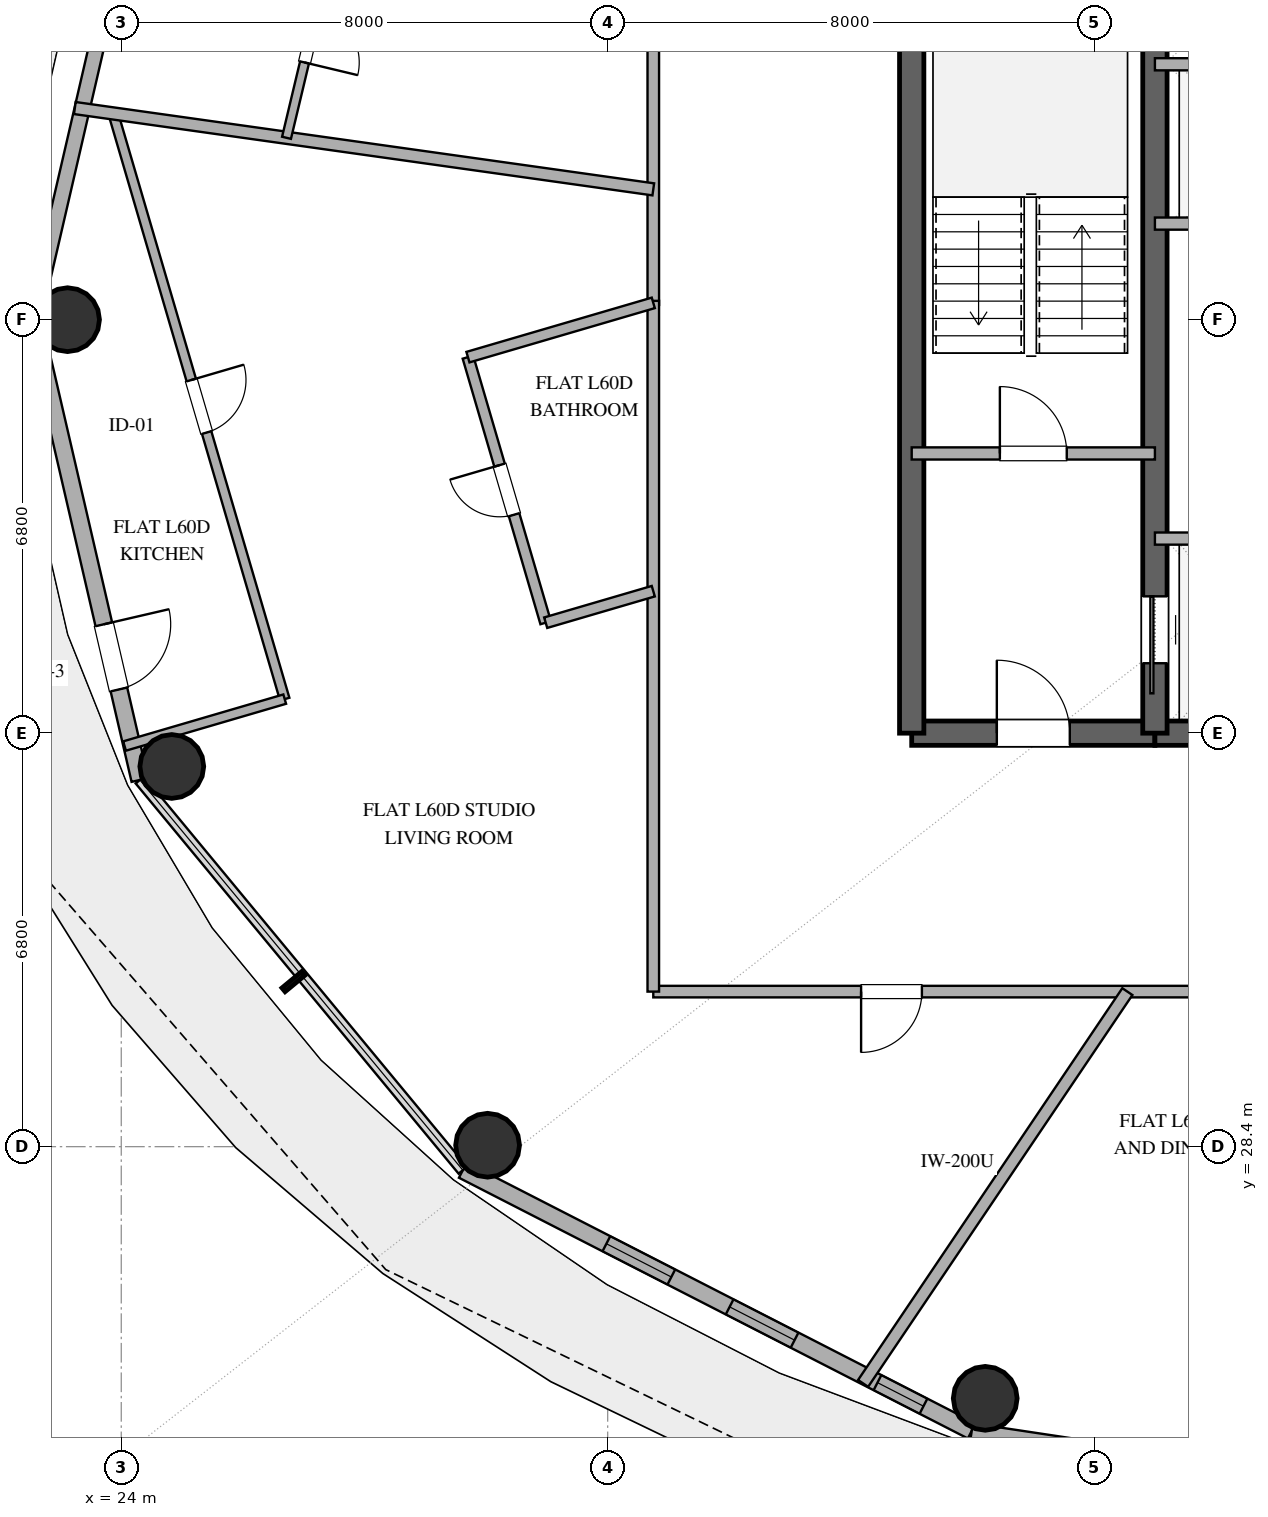
"""IFC4 building model, lengths in metres.
Left out: names, types, materials, properties, quantities, classifications, styles, units other than length and angle.
Written with IfcOpenShell. Run it as: python <this file> out.ifc"""

import sys

from ifc_helpers import new_model, si_unit, direction, frame, frame_2d, origin, origin_2d, place, context, subcontext, project, spatial, rectangle, hollow_circle, extrude, element, fill, save


model = new_model("IFC4")
c1 = context("Model", 3, precision=1e-05, world=origin(), true_north=direction((0.0, 1.0)))
c2 = subcontext(c1, "Body", "Model", "MODEL_VIEW")
j1 = project(units=[si_unit("LENGTHUNIT", "METRE"), si_unit("PLANEANGLEUNIT", "RADIAN")], contexts=[c1])
p1 = place(None, origin())
s1 = spatial("IfcSite", under=j1, at=p1, CompositionType="ELEMENT")
p2 = place(p1, origin())
s2 = spatial("IfcBuilding", under=s1, at=p2, CompositionType="ELEMENT")
p3 = place(p2, frame((0.0, 0.0, 235.2)))
s3 = spatial("IfcBuildingStorey", under=s2, at=p3, CompositionType="ELEMENT", Elevation=235.2)
p4 = place(p3, frame((37.0, 35.2, 0.0), z_axis=(0.0, 0.0, 1.0), x_axis=(1.0, 0.0, 0.0)))
e1 = element("IfcWall", 1, at=p4, inside=s3, PredefinedType="SHEAR", context=c2, shape_type="SweptSolid", body=[
    extrude(rectangle(XDim=4.0, YDim=0.4, at=frame_2d((2.0, 0.0))), origin(), (0.0, 0.0, 1.0), 3.36),
])
p5 = place(p4, frame((1.4, 0.0, 0.0)))
e2 = element("IfcOpeningElement", 2, at=p5, cuts=e1, PredefinedType="OPENING", context=c2, shape_type="SweptSolid", body=[
    extrude(rectangle(XDim=1.2, YDim=2.15, at=frame_2d((0.6, 1.075))), frame((0.0, 0.21, 0.0), z_axis=(0.0, -1.0, 0.0), x_axis=(1.0, 0.0, 0.0)), (0.0, 0.0, 1.0), 0.42),
])
p6 = place(p3, frame((41.0, 35.2, 0.0), z_axis=(0.0, 0.0, 1.0), x_axis=(1.0, 0.0, 0.0)))
e3 = element("IfcWall", 3, at=p6, inside=s3, PredefinedType="SHEAR", context=c2, shape_type="SweptSolid", body=[
    extrude(rectangle(XDim=14.0, YDim=0.4, at=frame_2d((7.0, 0.0))), origin(), (0.0, 0.0, 1.0), 3.36),
])
p7 = place(p6, frame((6.1, 0.0, 0.0)))
e4 = element("IfcOpeningElement", 4, at=p7, cuts=e3, PredefinedType="OPENING", context=c2, shape_type="SweptSolid", body=[
    extrude(rectangle(XDim=1.8, YDim=2.25, at=frame_2d((0.9, 1.125))), frame((0.0, 0.21, 0.0), z_axis=(0.0, -1.0, 0.0), x_axis=(1.0, 0.0, 0.0)), (0.0, 0.0, 1.0), 0.42),
])
p8 = place(p3, frame((37.0, 35.2, 0.0), z_axis=(0.0, 0.0, 1.0), x_axis=(0.0, 1.0, 0.0)))
e5 = element("IfcWall", 5, at=p8, inside=s3, PredefinedType="SHEAR", context=c2, shape_type="SweptSolid", body=[
    extrude(rectangle(XDim=13.6, YDim=0.4, at=frame_2d((6.8, 0.0))), origin(), (0.0, 0.0, 1.0), 3.36),
])
p9 = place(p3, frame((41.0, 35.2, 0.0), z_axis=(0.0, 0.0, 1.0), x_axis=(0.0, 1.0, 0.0)))
e6 = element("IfcWall", 6, at=p9, inside=s3, PredefinedType="SHEAR", context=c2, shape_type="SweptSolid", body=[
    extrude(rectangle(XDim=13.6, YDim=0.4, at=frame_2d((6.8, 0.0))), origin(), (0.0, 0.0, 1.0), 3.36),
])
p10 = place(p9, frame((1.15, 0.0, 0.0)))
e7 = element("IfcOpeningElement", 7, at=p10, cuts=e6, PredefinedType="OPENING", context=c2, shape_type="SweptSolid", body=[
    extrude(rectangle(XDim=1.1, YDim=2.2, at=frame_2d((0.55, 1.1))), frame((0.0, 0.21, 0.0), z_axis=(0.0, -1.0, 0.0), x_axis=(1.0, 0.0, 0.0)), (0.0, 0.0, 1.0), 0.42),
])
for number, where, z_axis, x_axis in (
    (8, (23.117, 42.0, 0.0), (0.0, 0.0, 1.0), (1.0, 0.0, 0.0)),
    (9, (24.831, 34.653, 0.0), (0.0, 0.0, 1.0), (1.0, 0.0, 0.0)),
    (10, (30.025, 28.424, 0.0), (0.0, 0.0, 1.0), (1.0, 0.0, 0.0)),
    (11, (38.209, 24.261, 0.0), (0.0, 0.0, 1.0), (1.0, 0.0, 0.0)),
):
    element("IfcColumn", number, at=place(p3, frame(where, z_axis=z_axis, x_axis=x_axis)), inside=s3, PredefinedType="COLUMN", context=c2, shape_type="SweptSolid", body=[
        extrude(hollow_circle(Radius=0.525, WallThickness=0.028, at=origin_2d()), origin(), (0.0, 0.0, 1.0), 3.36),
    ])
p11 = place(p3, frame((24.306, 49.57, 0.0), z_axis=(0.0, 0.0, 1.0), x_axis=(-0.225635078214, -0.974211892495, 0.0)))
e12 = element("IfcWall", 12, at=p11, inside=s3, PredefinedType="SOLIDWALL", context=c2, shape_type="SweptSolid", body=[
    extrude(rectangle(XDim=7.77, YDim=0.25, at=frame_2d((3.885, 0.0))), origin(), (0.0, 0.0, 1.0), 3.36),
])
p12 = place(p3, frame((22.553, 42.0, 0.0), z_axis=(0.0, 0.0, 1.0), x_axis=(0.225635078214, -0.974211892495, 0.0)))
e13 = element("IfcWall", 13, at=p12, inside=s3, PredefinedType="SOLIDWALL", context=c2, shape_type="SweptSolid", body=[
    extrude(rectangle(XDim=7.77, YDim=0.28, at=frame_2d((3.885, 0.0))), origin(), (0.0, 0.0, 1.0), 3.36),
])
p13 = place(p12, frame((5.142, 0.0, 0.0)))
e14 = element("IfcOpeningElement", 14, at=p13, cuts=e13, PredefinedType="OPENING", context=c2, shape_type="SweptSolid", body=[
    extrude(rectangle(XDim=1.1, YDim=2.25, at=frame_2d((0.55, 1.125))), frame((0.0, 0.15, 0.0), z_axis=(0.0, -1.0, 0.0), x_axis=(1.0, 0.0, 0.0)), (0.0, 0.0, 1.0), 0.3),
])
p14 = place(p3, frame((29.617, 28.013, 0.0), z_axis=(0.0, 0.0, 1.0), x_axis=(0.890007394051, -0.455946091699, 0.0)))
e15 = element("IfcWall", 15, at=p14, inside=s3, PredefinedType="SOLIDWALL", context=c2, shape_type="SweptSolid", body=[
    extrude(rectangle(XDim=9.404, YDim=0.28, at=frame_2d((4.702, 0.0))), origin(), (0.0, 0.0, 1.0), 3.36),
])
p15 = place(p14, frame((2.653, 0.0, 0.85)))
e16 = element("IfcOpeningElement", 16, at=p15, cuts=e15, PredefinedType="OPENING", context=c2, shape_type="SweptSolid", body=[
    extrude(rectangle(XDim=1.2, YDim=1.6, at=frame_2d((0.6, 0.8))), frame((0.0, 0.15, 0.0), z_axis=(0.0, -1.0, 0.0), x_axis=(1.0, 0.0, 0.0)), (0.0, 0.0, 1.0), 0.3),
])
p16 = place(p14, frame((4.93, 0.0, 0.85)))
e17 = element("IfcOpeningElement", 17, at=p16, cuts=e15, PredefinedType="OPENING", context=c2, shape_type="SweptSolid", body=[
    extrude(rectangle(XDim=1.2, YDim=1.6, at=frame_2d((0.6, 0.8))), frame((0.0, 0.15, 0.0), z_axis=(0.0, -1.0, 0.0), x_axis=(1.0, 0.0, 0.0)), (0.0, 0.0, 1.0), 0.3),
])
p17 = place(p14, frame((7.663, 0.0, 0.85)))
e18 = element("IfcOpeningElement", 18, at=p17, cuts=e15, PredefinedType="OPENING", context=c2, shape_type="SweptSolid", body=[
    extrude(rectangle(XDim=0.85, YDim=1.8, at=frame_2d((0.425, 0.9))), frame((0.0, 0.15, 0.0), z_axis=(0.0, -1.0, 0.0), x_axis=(1.0, 0.0, 0.0)), (0.0, 0.0, 1.0), 0.3),
])
p18 = place(p3, frame((37.987, 23.726, 0.0), z_axis=(0.0, 0.0, 1.0), x_axis=(0.988882522213, -0.148698881169, 0.0)))
e19 = element("IfcWall", 19, at=p18, inside=s3, PredefinedType="SOLIDWALL", context=c2, shape_type="SweptSolid", body=[
    extrude(rectangle(XDim=10.125, YDim=0.25, at=frame_2d((5.062, 0.0))), origin(), (0.0, 0.0, 1.0), 3.36),
])
p19 = place(p18, frame((8.259, 0.0, 0.35)))
e20 = element("IfcOpeningElement", 20, at=p19, cuts=e19, PredefinedType="OPENING", context=c2, shape_type="SweptSolid", body=[
    extrude(rectangle(XDim=1.0, YDim=1.05, at=frame_2d((0.5, 0.525))), frame((0.0, 0.135, 0.0), z_axis=(0.0, -1.0, 0.0), x_axis=(1.0, 0.0, 0.0)), (0.0, 0.0, 1.0), 0.27),
])
p20 = place(p3, frame((37.0, 39.8, 0.0), z_axis=(0.0, 0.0, 1.0), x_axis=(1.0, 0.0, 0.0)))
e21 = element("IfcWall", 21, at=p20, inside=s3, PredefinedType="SOLIDWALL", context=c2, shape_type="SweptSolid", body=[
    extrude(rectangle(XDim=4.0, YDim=0.2, at=frame_2d((2.0, 0.0))), origin(), (0.0, 0.0, 1.0), 2.72),
])
p21 = place(p20, frame((1.45, 0.0, 0.0)))
e22 = element("IfcOpeningElement", 22, at=p21, cuts=e21, PredefinedType="OPENING", context=c2, shape_type="SweptSolid", body=[
    extrude(rectangle(XDim=1.1, YDim=2.15, at=frame_2d((0.55, 1.075))), frame((0.0, 0.11, 0.0), z_axis=(0.0, -1.0, 0.0), x_axis=(1.0, 0.0, 0.0)), (0.0, 0.0, 1.0), 0.22),
])
for number, where, z_axis, x_axis in (
    (23, (41.0, 38.4, 0.0), (0.0, 0.0, 1.0), (1.0, 0.0, 0.0)),
    (24, (41.0, 46.2, 0.0), (0.0, 0.0, 1.0), (1.0, 0.0, 0.0)),
    (25, (41.0, 43.58, 0.0), (0.0, 0.0, 1.0), (1.0, 0.0, 0.0)),
):
    element("IfcWall", number, at=place(p3, frame(where, z_axis=z_axis, x_axis=x_axis)), inside=s3, PredefinedType="SOLIDWALL", context=c2, shape_type="SweptSolid", body=[
        extrude(rectangle(XDim=2.95, YDim=0.2, at=frame_2d((1.475, 0.0))), origin(), (0.0, 0.0, 1.0), 2.72),
    ])
p22 = place(p3, frame((23.868, 45.392, 0.0), z_axis=(0.0, 0.0, 1.0), x_axis=(0.281018983641, -0.959702209455, 0.0)))
e26 = element("IfcWall", 26, at=p22, inside=s3, PredefinedType="PLUMBINGWALL", context=c2, shape_type="SweptSolid", body=[
    extrude(rectangle(XDim=10.036, YDim=0.16, at=frame_2d((5.018, 0.0))), origin(), (0.0, 0.0, 1.0), 2.72),
])
p23 = place(p22, frame((4.568, 0.0, 0.0)))
e27 = element("IfcOpeningElement", 27, at=p23, cuts=e26, PredefinedType="OPENING", context=c2, shape_type="SweptSolid", body=[
    extrude(rectangle(XDim=0.9, YDim=2.1, at=frame_2d((0.45, 1.05))), frame((0.0, 0.09, 0.0), z_axis=(0.0, -1.0, 0.0), x_axis=(1.0, 0.0, 0.0)), (0.0, 0.0, 1.0), 0.18),
])
p24 = place(p3, frame((32.75, 42.243, 0.0), z_axis=(0.0, 0.0, 1.0), x_axis=(0.0, 1.0, 0.0)))
e28 = element("IfcWall", 28, at=p24, inside=s3, PredefinedType="PARTITIONING", context=c2, shape_type="SweptSolid", body=[
    extrude(rectangle(XDim=10.807, YDim=0.19, at=frame_2d((5.404, 0.0))), origin(), (0.0, 0.0, 1.0), 2.72),
])
p25 = place(p24, frame((5.837, 0.0, 0.0)))
e29 = element("IfcOpeningElement", 29, at=p25, cuts=e28, PredefinedType="OPENING", context=c2, shape_type="SweptSolid", body=[
    extrude(rectangle(XDim=1.0, YDim=2.2, at=frame_2d((0.5, 1.1))), frame((0.0, 0.105, 0.0), z_axis=(0.0, -1.0, 0.0), x_axis=(1.0, 0.0, 0.0)), (0.0, 0.0, 1.0), 0.21),
])
p26 = place(p3, frame((51.226, 30.95, 0.0), z_axis=(0.0, 0.0, 1.0), x_axis=(-1.0, 0.0, 0.0)))
e30 = element("IfcWall", 30, at=p26, inside=s3, PredefinedType="PARTITIONING", context=c2, shape_type="SweptSolid", body=[
    extrude(rectangle(XDim=18.476, YDim=0.19, at=frame_2d((9.238, 0.0))), origin(), (0.0, 0.0, 1.0), 2.72),
])
p27 = place(p26, frame((14.058, 0.0, 0.0)))
e31 = element("IfcOpeningElement", 31, at=p27, cuts=e30, PredefinedType="OPENING", context=c2, shape_type="SweptSolid", body=[
    extrude(rectangle(XDim=1.0, YDim=2.2, at=frame_2d((0.5, 1.1))), frame((0.0, 0.105, 0.0), z_axis=(0.0, -1.0, 0.0), x_axis=(1.0, 0.0, 0.0)), (0.0, 0.0, 1.0), 0.21),
])
p28 = place(p26, frame((6.839, 0.0, 0.0)))
e32 = element("IfcOpeningElement", 32, at=p28, cuts=e30, PredefinedType="OPENING", context=c2, shape_type="SweptSolid", body=[
    extrude(rectangle(XDim=1.0, YDim=2.2, at=frame_2d((0.5, 1.1))), frame((0.0, 0.105, 0.0), z_axis=(0.0, -1.0, 0.0), x_axis=(1.0, 0.0, 0.0)), (0.0, 0.0, 1.0), 0.21),
])
p29 = place(p3, frame((36.201, 24.507, 0.0), z_axis=(0.0, 0.0, 1.0), x_axis=(0.559208454265, 0.8290270832, 0.0)))
e33 = element("IfcWall", 33, at=p29, inside=s3, PredefinedType="PARTITIONING", context=c2, shape_type="SweptSolid", body=[
    extrude(rectangle(XDim=7.771, YDim=0.2, at=frame_2d((3.886, 0.0))), origin(), (0.0, 0.0, 1.0), 2.72),
])
p30 = place(p3, frame((32.75, 30.95, 0.0), z_axis=(0.0, 0.0, 1.0), x_axis=(0.0, 1.0, 0.0)))
e34 = element("IfcWall", 34, at=p30, inside=s3, PredefinedType="PARTITIONING", context=c2, shape_type="SweptSolid", body=[
    extrude(rectangle(XDim=11.36, YDim=0.19, at=frame_2d((5.68, 0.0))), origin(), (0.0, 0.0, 1.0), 2.72),
])
p31 = place(p3, frame((23.237, 45.48, 0.0), z_axis=(0.0, 0.0, 1.0), x_axis=(0.990269661234, -0.139161769316, 0.0)))
e35 = element("IfcWall", 35, at=p31, inside=s3, PredefinedType="PARTITIONING", context=c2, shape_type="SweptSolid", body=[
    extrude(rectangle(XDim=9.607, YDim=0.2, at=frame_2d((4.803, 0.0))), origin(), (0.0, 0.0, 1.0), 2.72),
])
p32 = place(p3, frame((30.98, 37.017, 0.0), z_axis=(0.0, 0.0, 1.0), x_axis=(-0.281021691617, 0.959701416504, 0.0)))
e36 = element("IfcWall", 36, at=p32, inside=s3, PredefinedType="PLUMBINGWALL", context=c2, shape_type="SweptSolid", body=[
    extrude(rectangle(XDim=4.551, YDim=0.18, at=frame_2d((2.275, 0.0))), origin(), (0.0, 0.0, 1.0), 2.72),
])
p33 = place(p32, frame((1.85, 0.0, 0.0)))
e37 = element("IfcOpeningElement", 37, at=p33, cuts=e36, PredefinedType="OPENING", context=c2, shape_type="SweptSolid", body=[
    extrude(rectangle(XDim=0.85, YDim=2.1, at=frame_2d((0.425, 1.05))), frame((0.0, 0.1, 0.0), z_axis=(0.0, -1.0, 0.0), x_axis=(1.0, 0.0, 0.0)), (0.0, 0.0, 1.0), 0.2),
])
p34 = place(p3, frame((27.519, 48.345, 0.0), z_axis=(0.0, 0.0, 1.0), x_axis=(-0.232293676314, -0.97264569497, 0.0)))
e38 = element("IfcWall", 38, at=p34, inside=s3, PredefinedType="PARTITIONING", context=c2, shape_type="SweptSolid", body=[
    extrude(rectangle(XDim=3.448, YDim=0.15, at=frame_2d((1.724, 0.0))), origin(), (0.0, 0.0, 1.0), 2.72),
])
p35 = place(p34, frame((1.274, 0.0, 0.0)))
e39 = element("IfcOpeningElement", 39, at=p35, cuts=e38, PredefinedType="OPENING", context=c2, shape_type="SweptSolid", body=[
    extrude(rectangle(XDim=0.9, YDim=2.1, at=frame_2d((0.45, 1.05))), frame((0.0, 0.085, 0.0), z_axis=(0.0, -1.0, 0.0), x_axis=(1.0, 0.0, 0.0)), (0.0, 0.0, 1.0), 0.17),
])
p36 = place(p3, frame((29.702, 41.384, 0.0), z_axis=(0.0, 0.0, 1.0), x_axis=(0.959705055225, 0.281009264929, 0.0)))
e40 = element("IfcWall", 40, at=p36, inside=s3, PredefinedType="PLUMBINGWALL", context=c2, shape_type="SweptSolid", body=[
    extrude(rectangle(XDim=3.176, YDim=0.18, at=frame_2d((1.588, 0.0))), origin(), (0.0, 0.0, 1.0), 2.72),
])
p37 = place(p3, frame((26.688, 35.76, 0.0), z_axis=(0.0, 0.0, 1.0), x_axis=(-0.959690607454, -0.281058602368, 0.0)))
e41 = element("IfcWall", 41, at=p37, inside=s3, PredefinedType="PLUMBINGWALL", context=c2, shape_type="SweptSolid", body=[
    extrude(rectangle(XDim=2.745, YDim=0.16, at=frame_2d((1.373, 0.0))), origin(), (0.0, 0.0, 1.0), 2.72),
])
p38 = place(p3, frame((32.75, 37.535, 0.0), z_axis=(0.0, 0.0, 1.0), x_axis=(-0.959679055102, -0.281098045527, 0.0)))
e42 = element("IfcWall", 42, at=p38, inside=s3, PredefinedType="PLUMBINGWALL", context=c2, shape_type="SweptSolid", body=[
    extrude(rectangle(XDim=1.844, YDim=0.18, at=frame_2d((0.922, 0.0))), origin(), (0.0, 0.0, 1.0), 2.72),
])
p39 = place(p13, origin())
e43 = element("IfcDoor", 43, at=p39, inside=s3, OperationType="SINGLE_SWING_LEFT", PredefinedType="DOOR", context=c2, shape_type="SweptSolid", body=[
    extrude(rectangle(XDim=1.1, YDim=2.25, at=frame_2d((0.55, 1.125))), frame((0.0, 0.025, 0.0), z_axis=(0.0, -1.0, 0.0), x_axis=(1.0, 0.0, 0.0)), (0.0, 0.0, 1.0), 0.05),
])
fill(e14, e43)
p40 = place(p15, origin())
e44 = element("IfcWindow", 44, at=p40, inside=s3, PartitioningType="SINGLE_PANEL", PredefinedType="WINDOW", context=c2, shape_type="SweptSolid", body=[
    extrude(rectangle(XDim=1.2, YDim=1.6, at=frame_2d((0.6, 0.8))), frame((0.0, 0.03, 0.0), z_axis=(0.0, -1.0, 0.0), x_axis=(1.0, 0.0, 0.0)), (0.0, 0.0, 1.0), 0.06),
])
fill(e16, e44)
p41 = place(p16, origin())
e45 = element("IfcWindow", 45, at=p41, inside=s3, PartitioningType="SINGLE_PANEL", PredefinedType="WINDOW", context=c2, shape_type="SweptSolid", body=[
    extrude(rectangle(XDim=1.2, YDim=1.6, at=frame_2d((0.6, 0.8))), frame((0.0, 0.03, 0.0), z_axis=(0.0, -1.0, 0.0), x_axis=(1.0, 0.0, 0.0)), (0.0, 0.0, 1.0), 0.06),
])
fill(e17, e45)
p42 = place(p17, origin())
e46 = element("IfcWindow", 46, at=p42, inside=s3, PartitioningType="SINGLE_PANEL", PredefinedType="WINDOW", context=c2, shape_type="SweptSolid", body=[
    extrude(rectangle(XDim=0.85, YDim=1.8, at=frame_2d((0.425, 0.9))), frame((0.0, 0.03, 0.0), z_axis=(0.0, -1.0, 0.0), x_axis=(1.0, 0.0, 0.0)), (0.0, 0.0, 1.0), 0.06),
])
fill(e18, e46)
p43 = place(p10, origin())
e47 = element("IfcDoor", 47, at=p43, inside=s3, OperationType="SLIDING_TO_LEFT", PredefinedType="DOOR", context=c2, shape_type="SweptSolid", body=[
    extrude(rectangle(XDim=1.1, YDim=2.2, at=frame_2d((0.55, 1.1))), frame((0.0, 0.025, 0.0), z_axis=(0.0, -1.0, 0.0), x_axis=(1.0, 0.0, 0.0)), (0.0, 0.0, 1.0), 0.05),
])
fill(e7, e47)
p44 = place(p5, origin())
e48 = element("IfcDoor", 48, at=p44, inside=s3, OperationType="SINGLE_SWING_LEFT", PredefinedType="DOOR", context=c2, shape_type="SweptSolid", body=[
    extrude(rectangle(XDim=1.2, YDim=2.15, at=frame_2d((0.6, 1.075))), frame((0.0, 0.025, 0.0), z_axis=(0.0, -1.0, 0.0), x_axis=(1.0, 0.0, 0.0)), (0.0, 0.0, 1.0), 0.05),
])
fill(e2, e48)
p45 = place(p21, origin())
e49 = element("IfcDoor", 49, at=p45, inside=s3, OperationType="SINGLE_SWING_LEFT", PredefinedType="DOOR", context=c2, shape_type="SweptSolid", body=[
    extrude(rectangle(XDim=1.1, YDim=2.15, at=frame_2d((0.55, 1.075))), frame((0.0, 0.025, 0.0), z_axis=(0.0, -1.0, 0.0), x_axis=(1.0, 0.0, 0.0)), (0.0, 0.0, 1.0), 0.05),
])
fill(e22, e49)
p46 = place(p23, origin())
e50 = element("IfcDoor", 50, at=p46, inside=s3, OperationType="SINGLE_SWING_LEFT", PredefinedType="DOOR", context=c2, shape_type="SweptSolid", body=[
    extrude(rectangle(XDim=0.9, YDim=2.1, at=frame_2d((0.45, 1.05))), frame((0.0, 0.025, 0.0), z_axis=(0.0, -1.0, 0.0), x_axis=(1.0, 0.0, 0.0)), (0.0, 0.0, 1.0), 0.05),
])
fill(e27, e50)
p47 = place(p27, origin())
e51 = element("IfcDoor", 51, at=p47, inside=s3, OperationType="SINGLE_SWING_RIGHT", PredefinedType="DOOR", context=c2, shape_type="SweptSolid", body=[
    extrude(rectangle(XDim=1.0, YDim=2.2, at=frame_2d((0.5, 1.1))), frame((0.0, 0.025, 0.0), z_axis=(0.0, -1.0, 0.0), x_axis=(1.0, 0.0, 0.0)), (0.0, 0.0, 1.0), 0.05),
])
fill(e31, e51)
p48 = place(p33, origin())
e52 = element("IfcDoor", 52, at=p48, inside=s3, OperationType="SINGLE_SWING_RIGHT", PredefinedType="DOOR", context=c2, shape_type="SweptSolid", body=[
    extrude(rectangle(XDim=0.85, YDim=2.1, at=frame_2d((0.425, 1.05))), frame((0.0, 0.025, 0.0), z_axis=(0.0, -1.0, 0.0), x_axis=(1.0, 0.0, 0.0)), (0.0, 0.0, 1.0), 0.05),
])
fill(e37, e52)
p49 = place(p35, origin())
e53 = element("IfcDoor", 53, at=p49, inside=s3, OperationType="SINGLE_SWING_RIGHT", PredefinedType="DOOR", context=c2, shape_type="SweptSolid", body=[
    extrude(rectangle(XDim=0.9, YDim=2.1, at=frame_2d((0.45, 1.05))), frame((0.0, 0.025, 0.0), z_axis=(0.0, -1.0, 0.0), x_axis=(1.0, 0.0, 0.0)), (0.0, 0.0, 1.0), 0.05),
])
fill(e39, e53)
save(model, sys.argv[1])
